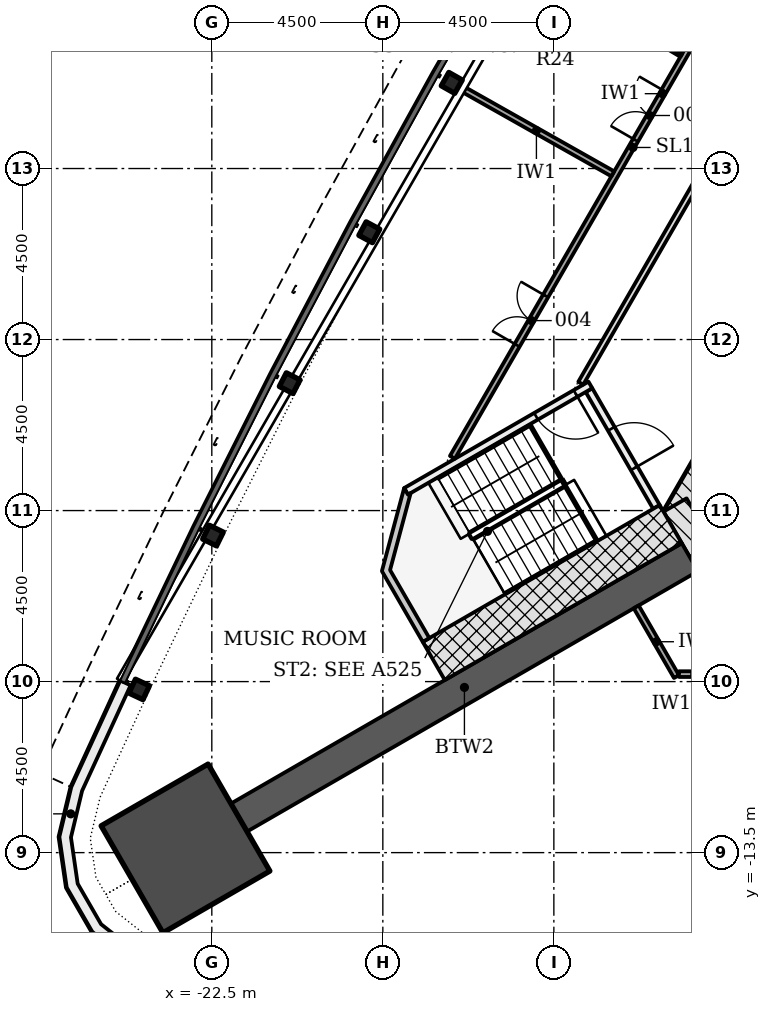
"""IFC4 building model, lengths in metres.
Left out: names, types, materials, properties, quantities, classifications, styles, units other than length and angle.
Written with IfcOpenShell. Run it as: python <this file> out.ifc"""

import sys

from ifc_helpers import new_model, si_unit, direction, frame, frame_2d, origin, origin_2d, place, context, subcontext, project, spatial, polyline, rectangle, i_section, outline, extrude, element, fill, save


model = new_model("IFC4")
c1 = context("Model", 3, precision=1e-05, world=origin(), true_north=direction((0.0, 1.0)))
c2 = subcontext(c1, "Body", "Model", "MODEL_VIEW")
j1 = project(units=[si_unit("LENGTHUNIT", "METRE"), si_unit("PLANEANGLEUNIT", "RADIAN")], contexts=[c1])
p1 = place(None, origin())
s1 = spatial("IfcSite", under=j1, at=p1, CompositionType="ELEMENT")
p2 = place(p1, origin())
s2 = spatial("IfcBuilding", under=s1, at=p2, CompositionType="ELEMENT")
p3 = place(p2, frame((0.0, 0.0, 58.2)))
s3 = spatial("IfcBuildingStorey", under=s2, at=p3, CompositionType="ELEMENT", Elevation=58.2)
p4 = place(p3, frame((-1.083, 11.281, -0.2), z_axis=(0.0, 0.0, 1.0), x_axis=(-0.500001446645, -0.866024568562, 0.0)))
e1 = element("IfcWall", 1, at=p4, inside=s3, PredefinedType="SHEAR", context=c2, shape_type="SweptSolid", body=[
    extrude(rectangle(XDim=18.458, YDim=0.7, at=frame_2d((9.229, 0.0))), origin(), (0.0, 0.0, 1.0), 3.6),
])
p5 = place(p4, frame((8.979, 0.0, 0.2)))
e2 = element("IfcOpeningElement", 2, at=p5, cuts=e1, PredefinedType="OPENING", context=c2, shape_type="SweptSolid", body=[
    extrude(rectangle(XDim=1.2, YDim=2.1, at=frame_2d((0.6, 1.05))), frame((0.0, 0.36, 0.0), z_axis=(0.0, -1.0, 0.0), x_axis=(1.0, 0.0, 0.0)), (0.0, 0.0, 1.0), 0.72),
])
p6 = place(p4, frame((11.029, 0.0, 0.2)))
e3 = element("IfcOpeningElement", 3, at=p6, cuts=e1, PredefinedType="OPENING", context=c2, shape_type="SweptSolid", body=[
    extrude(rectangle(XDim=1.2, YDim=2.1, at=frame_2d((0.6, 1.05))), frame((0.0, 0.36, 0.0), z_axis=(0.0, -1.0, 0.0), x_axis=(1.0, 0.0, 0.0)), (0.0, 0.0, 1.0), 0.72),
])
p7 = place(p3, frame((-10.311, -4.353, -0.2), z_axis=(0.0, 0.0, 1.0), x_axis=(0.500042739161, -0.866000726912, 0.0)))
e4 = element("IfcWall", 4, at=p7, inside=s3, PredefinedType="SHEAR", context=c2, shape_type="SweptSolid", body=[
    extrude(rectangle(XDim=2.771, YDim=0.7, at=frame_2d((1.386, 0.0))), origin(), (0.0, 0.0, 1.0), 3.6),
])
p8 = place(p3, frame((-9.922, -5.728, -0.2), z_axis=(0.0, 0.0, 1.0), x_axis=(-0.866030067197, -0.499991922645, 0.0)))
e5 = element("IfcWall", 5, at=p8, inside=s3, PredefinedType="SHEAR", context=c2, shape_type="SweptSolid", body=[
    extrude(rectangle(XDim=13.698, YDim=0.85, at=frame_2d((6.849, 0.0))), origin(), (0.0, 0.0, 1.0), 3.6),
])
p9 = place(p3, frame((-23.192, -13.39, -0.2), z_axis=(0.0, 0.0, 1.0), x_axis=(-0.866025403784, -0.5, 0.0)))
e6 = element("IfcColumn", 6, at=p9, inside=s3, PredefinedType="COLUMN", context=c2, shape_type="SweptSolid", body=[
    extrude(rectangle(XDim=3.25, YDim=3.25, at=origin_2d()), origin(), (0.0, 0.0, 1.0), 3.6),
])
for number, where, z_axis, x_axis in (
    (7, (-16.186, 6.753, -0.2), (0.0, 0.0, 1.0), (-0.492, -0.871, 0.0)),
    (8, (-18.356, 2.823, -0.2), (0.0, 0.0, 1.0), (-0.475, -0.88, 0.0)),
    (9, (-20.451, -1.148, -0.2), (0.0, 0.0, 1.0), (-0.458, -0.889, 0.0)),
    (10, (-22.469, -5.158, -0.2), (0.0, 0.0, 1.0), (-0.441, -0.897, 0.0)),
    (11, (-24.411, -9.206, -0.2), (0.0, 0.0, 1.0), (-0.424, -0.906, 0.0)),
):
    element("IfcColumn", number, at=place(p3, frame(where, z_axis=z_axis, x_axis=x_axis)), inside=s3, PredefinedType="COLUMN", context=c2, shape_type="SweptSolid", body=[
        extrude(i_section(OverallWidth=0.404, OverallDepth=0.406, WebThickness=0.027, FlangeThickness=0.044, FilletRadius=0.015, at=origin_2d()), origin(), (0.0, 0.0, 1.0), 3.6),
    ])
p10 = place(p3, origin())
e12 = element("IfcWall", 12, at=p10, inside=s3, PredefinedType="NOTDEFINED", context=c2, shape_type="SweptSolid", body=[
    extrude(outline(polyline([(-24.909, -8.973), (-26.198, -11.776), (-26.511, -13.085), (-26.318, -14.417), (-25.645, -15.583), (-24.588, -16.417), (-23.297, -16.8), (-23.212, -16.513), (-24.447, -16.146), (-25.414, -15.384), (-26.029, -14.317), (-26.206, -13.099), (-25.913, -11.875), (-24.636, -9.098), (-24.909, -8.973)])), origin(), (0.0, 0.0, 1.0), 3.3),
])
p11 = place(p3, frame((-12.576, -1.331, -0.2), z_axis=(0.0, 0.0, 1.0), x_axis=(0.499970499736, -0.8660424351, 0.0)))
e13 = element("IfcWall", 13, at=p11, inside=s3, PredefinedType="SHEAR", context=c2, shape_type="SweptSolid", body=[
    extrude(rectangle(XDim=3.55, YDim=0.2, at=frame_2d((1.775, 0.0))), origin(), (0.0, 0.0, 1.0), 3.6),
])
p12 = place(p11, frame((1.175, 0.0, 0.2)))
e14 = element("IfcOpeningElement", 14, at=p12, cuts=e13, PredefinedType="OPENING", context=c2, shape_type="SweptSolid", body=[
    extrude(rectangle(XDim=1.2, YDim=2.1, at=frame_2d((0.6, 1.05))), frame((0.0, 0.11, 0.0), z_axis=(0.0, -1.0, 0.0), x_axis=(1.0, 0.0, 0.0)), (0.0, 0.0, 1.0), 0.22),
])
p13 = place(p3, frame((-12.539, -1.194, -0.2), z_axis=(0.0, 0.0, 1.0), x_axis=(-0.866045472092, -0.499965239061, 0.0)))
e15 = element("IfcWall", 15, at=p13, inside=s3, PredefinedType="SHEAR", context=c2, shape_type="SweptSolid", body=[
    extrude(rectangle(XDim=5.6, YDim=0.2, at=frame_2d((2.8, 0.0))), origin(), (0.0, 0.0, 1.0), 3.6),
])
p14 = place(p13, frame((0.45, 0.0, 0.2)))
e16 = element("IfcOpeningElement", 16, at=p14, cuts=e15, PredefinedType="OPENING", context=c2, shape_type="SweptSolid", body=[
    extrude(rectangle(XDim=1.2, YDim=2.1, at=frame_2d((0.6, 1.05))), frame((0.0, 0.11, 0.0), z_axis=(0.0, -1.0, 0.0), x_axis=(1.0, 0.0, 0.0)), (0.0, 0.0, 1.0), 0.22),
])
p15 = place(p3, frame((-10.424, -4.858, -0.2), z_axis=(0.0, 0.0, 1.0), x_axis=(-0.866033125095, -0.499986626058, 0.0)))
e17 = element("IfcWall", 17, at=p15, inside=s3, PredefinedType="SHEAR", context=c2, shape_type="SweptSolid", body=[
    extrude(rectangle(XDim=7.2, YDim=1.161, at=frame_2d((3.6, 0.0))), origin(), (0.0, 0.0, 1.0), 3.6),
])
p16 = place(p3, frame((0.0, 0.0, -0.2)))
e18 = element("IfcWall", 18, at=p16, inside=s3, PredefinedType="SHEAR", context=c2, shape_type="SweptSolid", body=[
    extrude(outline(polyline([(-17.439, -3.907), (-18.025, -6.093), (-16.95, -7.955), (-16.777, -7.855), (-17.81, -6.065), (-17.267, -4.039), (-17.339, -4.081), (-17.339, -4.081), (-17.339, -4.081), (-17.339, -4.081), (-17.339, -4.081), (-17.339, -4.081), (-17.339, -4.081), (-17.339, -4.081), (-17.339, -4.081), (-17.339, -4.081), (-17.339, -4.081), (-17.339, -4.081), (-17.339, -4.081), (-17.339, -4.081), (-17.339, -4.081), (-17.339, -4.081), (-17.339, -4.081), (-17.439, -3.907)])), origin(), (0.0, 0.0, 1.0), 3.6),
])
p17 = place(p3, frame((-16.169, -3.099, 0.0), z_axis=(0.0, 0.0, 1.0), x_axis=(0.499999805269, 0.866025516212, 0.0)))
e19 = element("IfcWall", 19, at=p17, inside=s3, PredefinedType="PARTITIONING", context=c2, shape_type="SweptSolid", body=[
    extrude(rectangle(XDim=22.097, YDim=0.15, at=frame_2d((11.049, 0.0))), origin(), (0.0, 0.0, 1.0), 2.778),
])
p18 = place(p17, frame((15.558, 0.0, 0.0)))
e20 = element("IfcOpeningElement", 20, at=p18, cuts=e19, PredefinedType="OPENING", context=c2, shape_type="SweptSolid", body=[
    extrude(rectangle(XDim=1.0, YDim=2.1, at=frame_2d((0.5, 1.05))), frame((0.0, 0.085, 0.0), z_axis=(0.0, -1.0, 0.0), x_axis=(1.0, 0.0, 0.0)), (0.0, 0.0, 1.0), 0.17),
])
p19 = place(p17, frame((12.976, 0.0, 0.0)))
e21 = element("IfcOpeningElement", 21, at=p19, cuts=e19, PredefinedType="OPENING", context=c2, shape_type="SweptSolid", body=[
    extrude(rectangle(XDim=1.0, YDim=2.1, at=frame_2d((0.5, 1.05))), frame((0.0, 0.085, 0.0), z_axis=(0.0, -1.0, 0.0), x_axis=(1.0, 0.0, 0.0)), (0.0, 0.0, 1.0), 0.17),
])
p20 = place(p17, frame((9.635, 0.0, 0.0)))
e22 = element("IfcOpeningElement", 22, at=p20, cuts=e19, PredefinedType="OPENING", context=c2, shape_type="SweptSolid", body=[
    extrude(rectangle(XDim=1.5, YDim=2.1, at=frame_2d((0.75, 1.05))), frame((0.0, 0.085, 0.0), z_axis=(0.0, -1.0, 0.0), x_axis=(1.0, 0.0, 0.0)), (0.0, 0.0, 1.0), 0.17),
])
p21 = place(p17, frame((3.404, 0.0, 0.0)))
e23 = element("IfcOpeningElement", 23, at=p21, cuts=e19, PredefinedType="OPENING", context=c2, shape_type="SweptSolid", body=[
    extrude(rectangle(XDim=1.5, YDim=2.1, at=frame_2d((0.75, 1.05))), frame((0.0, 0.085, 0.0), z_axis=(0.0, -1.0, 0.0), x_axis=(1.0, 0.0, 0.0)), (0.0, 0.0, 1.0), 0.17),
])
p22 = place(p3, frame((-4.407, 13.374, 0.0), z_axis=(0.0, 0.0, 1.0), x_axis=(-0.499997181693, -0.866027030928, 0.0)))
e24 = element("IfcWall", 24, at=p22, inside=s3, PredefinedType="PARTITIONING", context=c2, shape_type="SweptSolid", body=[
    extrude(rectangle(XDim=16.77, YDim=0.15, at=frame_2d((8.385, 0.0))), origin(), (0.0, 0.0, 1.0), 2.778),
])
p23 = place(p22, frame((8.879, 0.0, 0.0)))
e25 = element("IfcOpeningElement", 25, at=p23, cuts=e24, PredefinedType="OPENING", context=c2, shape_type="SweptSolid", body=[
    extrude(rectangle(XDim=1.0, YDim=2.1, at=frame_2d((0.5, 1.05))), frame((0.0, 0.085, 0.0), z_axis=(0.0, -1.0, 0.0), x_axis=(1.0, 0.0, 0.0)), (0.0, 0.0, 1.0), 0.17),
])
p24 = place(p3, frame((-11.333, -7.034, 0.0), z_axis=(0.0, 0.0, 1.0), x_axis=(0.499981853705, -0.866035880299, 0.0)))
e26 = element("IfcWall", 26, at=p24, inside=s3, PredefinedType="PARTITIONING", context=c2, shape_type="SweptSolid", body=[
    extrude(rectangle(XDim=2.118, YDim=0.15, at=frame_2d((1.059, 0.0))), origin(), (0.0, 0.0, 1.0), 2.778),
])
p25 = place(p3, frame((-10.209, -8.803, 0.0), z_axis=(0.0, 0.0, 1.0), x_axis=(1.0, 0.0, 0.0)))
e27 = element("IfcWall", 27, at=p25, inside=s3, PredefinedType="PARTITIONING", context=c2, shape_type="SweptSolid", body=[
    extrude(rectangle(XDim=0.83, YDim=0.15, at=frame_2d((0.415, 0.0))), origin(), (0.0, 0.0, 1.0), 3.4),
])
p26 = place(p3, frame((-15.969, 6.63, 0.0), z_axis=(0.0, 0.0, 1.0), x_axis=(0.870757830179, -0.491712112097, 0.0)))
e28 = element("IfcWall", 28, at=p26, inside=s3, PredefinedType="PARTITIONING", context=c2, shape_type="SweptSolid", body=[
    extrude(rectangle(XDim=4.615, YDim=0.15, at=frame_2d((2.308, 0.0))), origin(), (0.0, 0.0, 1.0), 2.778),
])
p27 = place(p3, frame((-12.055, 8.61, 0.0), z_axis=(0.0, 0.0, 1.0), x_axis=(0.861222482917, -0.508228132749, 0.0)))
e29 = element("IfcWall", 29, at=p27, inside=s3, PredefinedType="PARTITIONING", context=c2, shape_type="SweptSolid", body=[
    extrude(rectangle(XDim=2.216, YDim=0.1, at=frame_2d((1.108, 0.0))), origin(), (0.0, 0.0, 1.0), 3.4),
])
p28 = place(p12, origin())
e30 = element("IfcDoor", 30, at=p28, inside=s3, OperationType="SINGLE_SWING_RIGHT", PredefinedType="DOOR", context=c2, shape_type="SweptSolid", body=[
    extrude(rectangle(XDim=1.2, YDim=2.1, at=frame_2d((0.6, 1.05))), frame((0.0, 0.025, 0.0), z_axis=(0.0, -1.0, 0.0), x_axis=(1.0, 0.0, 0.0)), (0.0, 0.0, 1.0), 0.05),
])
fill(e14, e30)
p29 = place(p14, origin())
e31 = element("IfcDoor", 31, at=p29, inside=s3, OperationType="SINGLE_SWING_LEFT", PredefinedType="DOOR", context=c2, shape_type="SweptSolid", body=[
    extrude(rectangle(XDim=1.2, YDim=2.1, at=frame_2d((0.6, 1.05))), frame((0.0, 0.025, 0.0), z_axis=(0.0, -1.0, 0.0), x_axis=(1.0, 0.0, 0.0)), (0.0, 0.0, 1.0), 0.05),
])
fill(e16, e31)
p30 = place(p20, origin())
e32 = element("IfcDoor", 32, at=p30, inside=s3, OperationType="DOUBLE_DOOR_SINGLE_SWING", PredefinedType="DOOR", context=c2, shape_type="SweptSolid", body=[
    extrude(rectangle(XDim=1.5, YDim=2.1, at=frame_2d((0.75, 1.05))), frame((0.0, 0.025, 0.0), z_axis=(0.0, -1.0, 0.0), x_axis=(1.0, 0.0, 0.0)), (0.0, 0.0, 1.0), 0.05),
])
fill(e22, e32)
p31 = place(p21, origin())
e33 = element("IfcDoor", 33, at=p31, inside=s3, OperationType="DOUBLE_DOOR_SINGLE_SWING", PredefinedType="DOOR", context=c2, shape_type="SweptSolid", body=[
    extrude(rectangle(XDim=1.5, YDim=2.1, at=frame_2d((0.75, 1.05))), frame((0.0, 0.025, 0.0), z_axis=(0.0, -1.0, 0.0), x_axis=(1.0, 0.0, 0.0)), (0.0, 0.0, 1.0), 0.05),
])
fill(e23, e33)
save(model, sys.argv[1])
